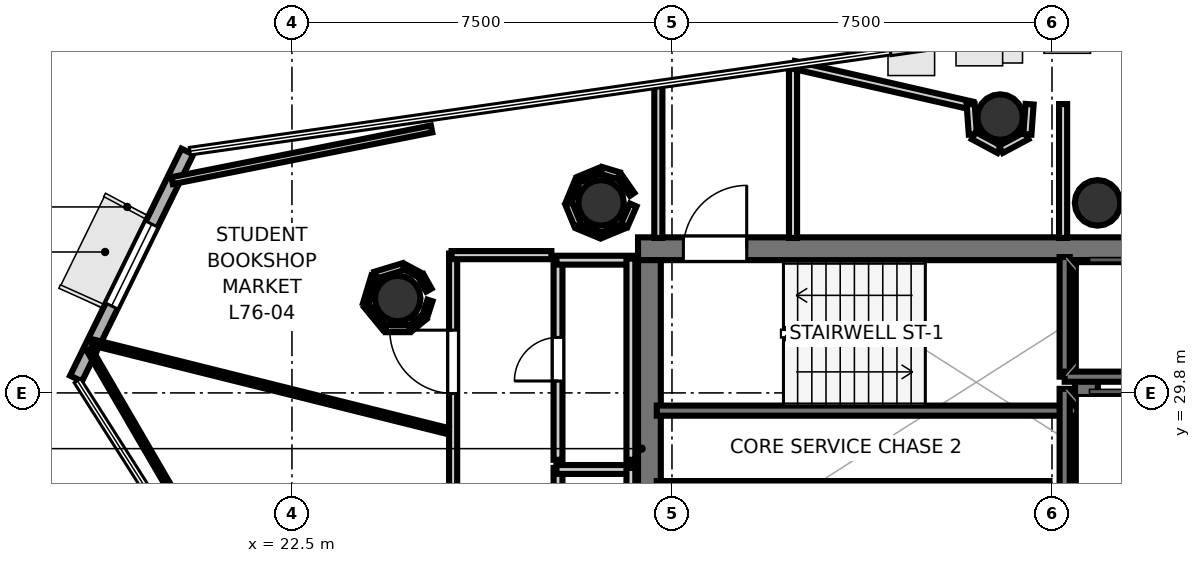
"""IFC4 building model, lengths in metres.
Left out: names, types, materials, properties, quantities, classifications, styles, units other than length and angle.
Written with IfcOpenShell. Run it as: python <this file> out.ifc"""

import sys

from ifc_helpers import new_model, si_unit, direction, frame, frame_2d, origin, origin_2d, place, context, subcontext, project, spatial, rectangle, hollow_circle, extrude, element, fill, save


model = new_model("IFC4")
c1 = context("Model", 3, precision=1e-05, world=origin(), true_north=direction((0.0, 1.0)))
c2 = subcontext(c1, "Body", "Model", "MODEL_VIEW")
j1 = project(units=[si_unit("LENGTHUNIT", "METRE"), si_unit("PLANEANGLEUNIT", "RADIAN")], contexts=[c1])
p1 = place(None, origin())
s1 = spatial("IfcSite", under=j1, at=p1, CompositionType="ELEMENT")
p2 = place(p1, origin())
s2 = spatial("IfcBuilding", under=s1, at=p2, CompositionType="ELEMENT")
p3 = place(p2, frame((0.0, 0.0, 295.4)))
s3 = spatial("IfcBuildingStorey", under=s2, at=p3, CompositionType="ELEMENT", Elevation=295.4)
p4 = place(p3, frame((29.33, 32.645, 0.0), z_axis=(0.0, 0.0, 1.0), x_axis=(1.0, 0.0, 0.0)))
e1 = element("IfcWall", 1, at=p4, inside=s3, PredefinedType="SHEAR", context=c2, shape_type="SweptSolid", body=[
    extrude(rectangle(XDim=10.52, YDim=0.45, at=frame_2d((5.26, 0.0))), origin(), (0.0, 0.0, 1.0), 3.52),
])
p5 = place(p4, frame((0.895, 0.0, 0.0)))
e2 = element("IfcOpeningElement", 2, at=p5, cuts=e1, PredefinedType="OPENING", context=c2, shape_type="SweptSolid", body=[
    extrude(rectangle(XDim=1.25, YDim=2.15, at=frame_2d((0.625, 1.075))), frame((0.0, 0.235, 0.0), z_axis=(0.0, -1.0, 0.0), x_axis=(1.0, 0.0, 0.0)), (0.0, 0.0, 1.0), 0.47),
])
for number, where, z_axis, x_axis in (
    (3, (29.555, 24.98, 0.0), (0.0, 0.0, 1.0), (0.0, 1.0, 0.0)),
    (4, (38.18, 24.98, 0.0), (0.0, 0.0, 1.0), (0.0, 1.0, 0.0)),
):
    element("IfcWall", number, at=place(p3, frame(where, z_axis=z_axis, x_axis=x_axis)), inside=s3, PredefinedType="SHEAR", context=c2, shape_type="SweptSolid", body=[
        extrude(rectangle(XDim=7.44, YDim=0.45, at=frame_2d((3.72, 0.0))), origin(), (0.0, 0.0, 1.0), 3.52),
    ])
for number, where, z_axis, x_axis in (
    (5, (28.6, 33.55, 0.0), (0.0, 0.0, 1.0), (1.0, 0.0, 0.0)),
    (6, (38.4, 33.55, 0.0), (0.0, 0.0, 1.0), (1.0, 0.0, 0.0)),
    (7, (36.476, 35.243, 0.0), (0.0, 0.0, 1.0), (1.0, 0.0, 0.0)),
    (8, (24.587, 31.663, 0.0), (0.0, 0.0, 1.0), (1.0, 0.0, 0.0)),
):
    element("IfcColumn", number, at=place(p3, frame(where, z_axis=z_axis, x_axis=x_axis)), inside=s3, PredefinedType="COLUMN", context=c2, shape_type="SweptSolid", body=[
        extrude(hollow_circle(Radius=0.45, WallThickness=0.025, at=origin_2d()), origin(), (0.0, 0.0, 1.0), 3.7),
    ])
p6 = place(p3, frame((20.436, 34.563, 0.0), z_axis=(0.0, 0.0, 1.0), x_axis=(-0.440488239438, -0.897758381145, 0.0)))
e9 = element("IfcWall", 9, at=p6, inside=s3, PredefinedType="SOLIDWALL", context=c2, shape_type="SweptSolid", body=[
    extrude(rectangle(XDim=4.99, YDim=0.26, at=frame_2d((2.495, 0.0))), origin(), (0.0, 0.0, 1.0), 3.52),
])
p7 = place(p6, frame((1.595, 0.0, 0.85)))
e10 = element("IfcOpeningElement", 10, at=p7, cuts=e9, PredefinedType="OPENING", context=c2, shape_type="SweptSolid", body=[
    extrude(rectangle(XDim=1.8, YDim=2.1, at=frame_2d((0.9, 1.05))), frame((0.0, 0.14, 0.0), z_axis=(0.0, -1.0, 0.0), x_axis=(1.0, 0.0, 0.0)), (0.0, 0.0, 1.0), 0.28),
])
p8 = place(p3, frame((29.7, 29.45, 0.0), z_axis=(0.0, 0.0, 1.0), x_axis=(1.0, 0.0, 0.0)))
e11 = element("IfcWall", 11, at=p8, inside=s3, PredefinedType="SOLIDWALL", context=c2, shape_type="SweptSolid", body=[
    extrude(rectangle(XDim=8.3, YDim=0.2, at=frame_2d((4.15, 0.0))), origin(), (0.0, 0.0, 1.0), 3.52),
])
p9 = place(p3, frame((29.7, 27.96, 0.0), z_axis=(0.0, 0.0, 1.0), x_axis=(1.0, 0.0, 0.0)))
e12 = element("IfcWall", 12, at=p9, inside=s3, PredefinedType="SOLIDWALL", context=c2, shape_type="SweptSolid", body=[
    extrude(rectangle(XDim=7.75, YDim=0.2, at=frame_2d((3.875, 0.0))), origin(), (0.0, 0.0, 1.0), 3.52),
])
p10 = place(p3, frame((37.75, 30.12, 0.0), z_axis=(0.0, 0.0, 1.0), x_axis=(0.0, 1.0, 0.0)))
e13 = element("IfcWall", 13, at=p10, inside=s3, PredefinedType="SOLIDWALL", context=c2, shape_type="SweptSolid", body=[
    extrude(rectangle(XDim=2.36, YDim=0.2, at=frame_2d((1.18, 0.0))), origin(), (0.0, 0.0, 1.0), 3.52),
])
p11 = place(p3, frame((37.75, 30.12, 0.0), z_axis=(0.0, 0.0, 1.0), x_axis=(1.0, 0.0, 0.0)))
e14 = element("IfcWall", 14, at=p11, inside=s3, PredefinedType="SOLIDWALL", context=c2, shape_type="SweptSolid", body=[
    extrude(rectangle(XDim=2.1, YDim=0.2, at=frame_2d((1.05, 0.0))), origin(), (0.0, 0.0, 1.0), 3.52),
])
p12 = place(p3, frame((37.75, 27.52, 0.0), z_axis=(0.0, 0.0, 1.0), x_axis=(0.0, 1.0, 0.0)))
e15 = element("IfcWall", 15, at=p12, inside=s3, PredefinedType="SOLIDWALL", context=c2, shape_type="SweptSolid", body=[
    extrude(rectangle(XDim=2.36, YDim=0.2, at=frame_2d((1.18, 0.0))), origin(), (0.0, 0.0, 1.0), 3.52),
])
p13 = place(p3, frame((29.731, 32.858, 0.0), z_axis=(0.0, 0.0, 1.0), x_axis=(0.0, 1.0, 0.0)))
e16 = element("IfcWall", 16, at=p13, inside=s3, PredefinedType="PARTITIONING", context=c2, shape_type="SweptSolid", body=[
    extrude(rectangle(XDim=3.053, YDim=0.16, at=frame_2d((1.526, 0.0))), origin(), (0.0, 0.0, 1.0), 2.84),
])
p14 = place(p3, frame((32.389, 36.29, 0.0), z_axis=(0.0, 0.0, 1.0), x_axis=(0.0, -1.0, 0.0)))
e17 = element("IfcWall", 17, at=p14, inside=s3, PredefinedType="PARTITIONING", context=c2, shape_type="SweptSolid", body=[
    extrude(rectangle(XDim=3.432, YDim=0.16, at=frame_2d((1.716, 0.0))), origin(), (0.0, 0.0, 1.0), 2.84),
])
p15 = place(p3, frame((27.751, 25.0, 0.0), z_axis=(0.0, 0.0, 1.0), x_axis=(0.0, 1.0, 0.0)))
e18 = element("IfcWall", 18, at=p15, inside=s3, PredefinedType="PLUMBINGWALL", context=c2, shape_type="SweptSolid", body=[
    extrude(rectangle(XDim=3.32, YDim=0.175, at=frame_2d((1.66, 0.0))), origin(), (0.0, 0.0, 1.0), 2.84),
])
p16 = place(p15, frame((1.21, 0.0, 0.0)))
e19 = element("IfcOpeningElement", 19, at=p16, cuts=e18, PredefinedType="OPENING", context=c2, shape_type="SweptSolid", body=[
    extrude(rectangle(XDim=0.9, YDim=2.1, at=frame_2d((0.45, 1.05))), frame((0.0, 0.097, 0.0), z_axis=(0.0, -1.0, 0.0), x_axis=(1.0, 0.0, 0.0)), (0.0, 0.0, 1.0), 0.195),
])
p17 = place(p3, frame((27.72, 28.289, 0.0), z_axis=(0.0, 0.0, 1.0), x_axis=(1.0, 0.0, 0.0)))
e20 = element("IfcWall", 20, at=p17, inside=s3, PredefinedType="PLUMBINGWALL", context=c2, shape_type="SweptSolid", body=[
    extrude(rectangle(XDim=1.5, YDim=0.175, at=frame_2d((0.75, 0.0))), origin(), (0.0, 0.0, 1.0), 2.84),
])
p18 = place(p3, frame((29.189, 28.32, 0.0), z_axis=(0.0, 0.0, 1.0), x_axis=(0.0, -1.0, 0.0)))
e21 = element("IfcWall", 21, at=p18, inside=s3, PredefinedType="PLUMBINGWALL", context=c2, shape_type="SweptSolid", body=[
    extrude(rectangle(XDim=3.32, YDim=0.175, at=frame_2d((1.66, 0.0))), origin(), (0.0, 0.0, 1.0), 2.84),
])
p19 = place(p3, frame((27.751, 28.48, 0.0), z_axis=(0.0, 0.0, 1.0), x_axis=(0.0, 1.0, 0.0)))
e22 = element("IfcWall", 22, at=p19, inside=s3, PredefinedType="PLUMBINGWALL", context=c2, shape_type="SweptSolid", body=[
    extrude(rectangle(XDim=3.97, YDim=0.175, at=frame_2d((1.985, 0.0))), origin(), (0.0, 0.0, 1.0), 2.84),
])
p20 = place(p19, frame((1.555, 0.0, 0.0)))
e23 = element("IfcOpeningElement", 23, at=p20, cuts=e22, PredefinedType="OPENING", context=c2, shape_type="SweptSolid", body=[
    extrude(rectangle(XDim=0.86, YDim=2.05, at=frame_2d((0.43, 1.025))), frame((0.0, 0.097, 0.0), z_axis=(0.0, -1.0, 0.0), x_axis=(1.0, 0.0, 0.0)), (0.0, 0.0, 1.0), 0.195),
])
p21 = place(p3, frame((27.72, 32.419, 0.0), z_axis=(0.0, 0.0, 1.0), x_axis=(1.0, 0.0, 0.0)))
e24 = element("IfcWall", 24, at=p21, inside=s3, PredefinedType="PLUMBINGWALL", context=c2, shape_type="SweptSolid", body=[
    extrude(rectangle(XDim=1.5, YDim=0.175, at=frame_2d((0.75, 0.0))), origin(), (0.0, 0.0, 1.0), 2.84),
])
p22 = place(p3, frame((29.189, 32.45, 0.0), z_axis=(0.0, 0.0, 1.0), x_axis=(0.0, -1.0, 0.0)))
e25 = element("IfcWall", 25, at=p22, inside=s3, PredefinedType="PLUMBINGWALL", context=c2, shape_type="SweptSolid", body=[
    extrude(rectangle(XDim=3.97, YDim=0.175, at=frame_2d((1.985, 0.0))), origin(), (0.0, 0.0, 1.0), 2.84),
])
p23 = place(p3, frame((32.405, 36.272, 0.0), z_axis=(0.0, 0.0, 1.0), x_axis=(0.974921840823, -0.222547532645, 0.0)))
e26 = element("IfcWall", 26, at=p23, inside=s3, PredefinedType="PARTITIONING", context=c2, shape_type="SweptSolid", body=[
    extrude(rectangle(XDim=3.61, YDim=0.16, at=frame_2d((1.805, 0.0))), origin(), (0.0, 0.0, 1.0), 2.84),
])
p24 = place(p3, frame((35.894, 35.498, 0.0), z_axis=(0.0, 0.0, 1.0), x_axis=(0.07354059826, -0.997292224179, 0.0)))
e27 = element("IfcWall", 27, at=p24, inside=s3, PredefinedType="PARTITIONING", context=c2, shape_type="SweptSolid", body=[
    extrude(rectangle(XDim=0.598, YDim=0.16, at=frame_2d((0.299, 0.0))), origin(), (0.0, 0.0, 1.0), 2.095),
])
for number, where, z_axis, x_axis in (
    (28, (35.954, 34.877, 0.0), (0.0, 0.0, 1.0), (0.882, -0.471, 0.0)),
    (29, (36.49, 34.606, 0.0), (0.0, 0.0, 1.0), (0.882, 0.471, 0.0)),
):
    element("IfcWall", number, at=place(p3, frame(where, z_axis=z_axis, x_axis=x_axis)), inside=s3, PredefinedType="PARTITIONING", context=c2, shape_type="SweptSolid", body=[
        extrude(rectangle(XDim=0.575, YDim=0.16, at=frame_2d((0.288, 0.0))), origin(), (0.0, 0.0, 1.0), 2.84),
    ])
p25 = place(p3, frame((37.014, 34.902, 0.0), z_axis=(0.0, 0.0, 1.0), x_axis=(0.073134230676, 0.997322106595, 0.0)))
e30 = element("IfcWall", 30, at=p25, inside=s3, PredefinedType="PARTITIONING", context=c2, shape_type="SweptSolid", body=[
    extrude(rectangle(XDim=0.598, YDim=0.16, at=frame_2d((0.299, 0.0))), origin(), (0.0, 0.0, 1.0), 2.84),
])
p26 = place(p3, frame((37.719, 35.5, 0.0), z_axis=(0.0, 0.0, 1.0), x_axis=(0.0, -1.0, 0.0)))
e31 = element("IfcWall", 31, at=p26, inside=s3, PredefinedType="PARTITIONING", context=c2, shape_type="SweptSolid", body=[
    extrude(rectangle(XDim=2.642, YDim=0.16, at=frame_2d((1.321, 0.0))), origin(), (0.0, 0.0, 1.0), 2.84),
])
p27 = place(p3, frame((25.681, 18.372, 0.0), z_axis=(0.0, 0.0, 1.0), x_axis=(0.0, 1.0, 0.0)))
e32 = element("IfcWall", 32, at=p27, inside=s3, PredefinedType="PARTITIONING", context=c2, shape_type="SweptSolid", body=[
    extrude(rectangle(XDim=14.178, YDim=0.16, at=frame_2d((7.089, 0.0))), origin(), (0.0, 0.0, 1.0), 2.84),
])
p28 = place(p27, frame((11.417, 0.0, 0.0)))
e33 = element("IfcOpeningElement", 33, at=p28, cuts=e32, PredefinedType="OPENING", context=c2, shape_type="SweptSolid", body=[
    extrude(rectangle(XDim=1.25, YDim=2.2, at=frame_2d((0.625, 1.1))), frame((0.0, 0.09, 0.0), z_axis=(0.0, -1.0, 0.0), x_axis=(1.0, 0.0, 0.0)), (0.0, 0.0, 1.0), 0.18),
])
p29 = place(p27, frame((5.215, 0.0, 0.0)))
e34 = element("IfcOpeningElement", 34, at=p29, cuts=e32, PredefinedType="OPENING", context=c2, shape_type="SweptSolid", body=[
    extrude(rectangle(XDim=1.25, YDim=2.2, at=frame_2d((0.625, 1.1))), frame((0.0, 0.09, 0.0), z_axis=(0.0, -1.0, 0.0), x_axis=(1.0, 0.0, 0.0)), (0.0, 0.0, 1.0), 0.18),
])
p30 = place(p3, frame((25.65, 32.519, 0.0), z_axis=(0.0, 0.0, 1.0), x_axis=(1.0, 0.0, 0.0)))
e35 = element("IfcWall", 35, at=p30, inside=s3, PredefinedType="PARTITIONING", context=c2, shape_type="SweptSolid", body=[
    extrude(rectangle(XDim=1.97, YDim=0.16, at=frame_2d((0.985, 0.0))), origin(), (0.0, 0.0, 1.0), 2.84),
])
p31 = place(p3, frame((56.387, 35.955, 0.0), z_axis=(0.0, 0.0, 1.0), x_axis=(-0.547085490545, -0.837076738439, 0.0)))
e36 = element("IfcWall", 36, at=p31, inside=s3, PredefinedType="PARTITIONING", context=c2, shape_type="SweptSolid", body=[
    extrude(rectangle(XDim=34.443, YDim=0.12, at=frame_2d((17.221, 0.0))), origin(), (0.0, 0.0, 1.0), 2.095),
])
p32 = place(p3, frame((25.203, 31.829, 0.0), z_axis=(0.0, 0.0, 1.0), x_axis=(-0.488926990846, 0.872324708823, 0.0)))
e37 = element("IfcWall", 37, at=p32, inside=s3, PredefinedType="PARTITIONING", context=c2, shape_type="SweptSolid", body=[
    extrude(rectangle(XDim=0.322, YDim=0.12, at=frame_2d((0.161, 0.0))), origin(), (0.0, 0.0, 1.0), 2.84),
])
p33 = place(p3, frame((25.033, 32.122, 0.0), z_axis=(0.0, 0.0, 1.0), x_axis=(-0.881817981942, 0.471589913721, 0.0)))
e38 = element("IfcWall", 38, at=p33, inside=s3, PredefinedType="PARTITIONING", context=c2, shape_type="SweptSolid", body=[
    extrude(rectangle(XDim=0.354, YDim=0.105, at=frame_2d((0.177, 0.0))), origin(), (0.0, 0.0, 1.0), 2.84),
])
p34 = place(p3, frame((24.697, 32.291, 0.0), z_axis=(0.0, 0.0, 1.0), x_axis=(-0.956910072495, -0.290384423064, 0.0)))
e39 = element("IfcWall", 39, at=p34, inside=s3, PredefinedType="PARTITIONING", context=c2, shape_type="SweptSolid", body=[
    extrude(rectangle(XDim=0.575, YDim=0.14, at=frame_2d((0.288, 0.0))), origin(), (0.0, 0.0, 1.0), 2.84),
])
p35 = place(p3, frame((24.126, 32.103, 0.0), z_axis=(0.0, 0.0, 1.0), x_axis=(-0.290384423064, -0.956910072495, 0.0)))
e40 = element("IfcWall", 40, at=p35, inside=s3, PredefinedType="PARTITIONING", context=c2, shape_type="SweptSolid", body=[
    extrude(rectangle(XDim=0.575, YDim=0.12, at=frame_2d((0.288, 0.0))), origin(), (0.0, 0.0, 1.0), 2.84),
])
p36 = place(p3, frame((23.965, 31.524, 0.0), z_axis=(0.0, 0.0, 1.0), x_axis=(0.634277575631, -0.77310539841, 0.0)))
e41 = element("IfcWall", 41, at=p36, inside=s3, PredefinedType="PARTITIONING", context=c2, shape_type="SweptSolid", body=[
    extrude(rectangle(XDim=0.575, YDim=0.105, at=frame_2d((0.288, 0.0))), origin(), (0.0, 0.0, 1.0), 2.84),
])
p37 = place(p3, frame((24.354, 31.068, 0.0), z_axis=(0.0, 0.0, 1.0), x_axis=(1.0, 0.0, 0.0)))
e42 = element("IfcWall", 42, at=p37, inside=s3, PredefinedType="PARTITIONING", context=c2, shape_type="SweptSolid", body=[
    extrude(rectangle(XDim=0.467, YDim=0.14, at=frame_2d((0.233, 0.0))), origin(), (0.0, 0.0, 1.0), 2.84),
])
p38 = place(p3, frame((24.84, 31.075, 0.0), z_axis=(0.0, 0.0, 1.0), x_axis=(0.773281307259, 0.634063103992, 0.0)))
e43 = element("IfcWall", 43, at=p38, inside=s3, PredefinedType="PARTITIONING", context=c2, shape_type="SweptSolid", body=[
    extrude(rectangle(XDim=0.354, YDim=0.12, at=frame_2d((0.177, 0.0))), origin(), (0.0, 0.0, 1.0), 2.84),
])
p39 = place(p3, frame((25.124, 31.315, 0.0), z_axis=(0.0, 0.0, 1.0), x_axis=(0.306761714687, 0.951786347035, 0.0)))
e44 = element("IfcWall", 44, at=p39, inside=s3, PredefinedType="PARTITIONING", context=c2, shape_type="SweptSolid", body=[
    extrude(rectangle(XDim=0.325, YDim=0.105, at=frame_2d((0.163, 0.0))), origin(), (0.0, 0.0, 1.0), 2.84),
])
p40 = place(p3, frame((25.577, 29.048, 0.0), z_axis=(0.0, 0.0, 1.0), x_axis=(-0.970297325038, 0.241915483226, 0.0)))
e45 = element("IfcWall", 45, at=p40, inside=s3, PredefinedType="PARTITIONING", context=c2, shape_type="SweptSolid", body=[
    extrude(rectangle(XDim=7.226, YDim=0.12, at=frame_2d((3.613, 0.0))), origin(), (0.0, 0.0, 1.0), 2.84),
])
p41 = place(p3, frame((20.136, 33.989, 0.0), z_axis=(0.0, 0.0, 1.0), x_axis=(0.980720741486, 0.195414501046, 0.0)))
e46 = element("IfcWall", 46, at=p41, inside=s3, PredefinedType="PARTITIONING", context=c2, shape_type="SweptSolid", body=[
    extrude(rectangle(XDim=5.22, YDim=0.14, at=frame_2d((2.61, 0.0))), origin(), (0.0, 0.0, 1.0), 2.84),
])
p42 = place(p3, frame((29.214, 33.719, 0.0), z_axis=(0.0, 0.0, 1.0), x_axis=(-0.57410245878, 0.818783467605, 0.0)))
e47 = element("IfcWall", 47, at=p42, inside=s3, PredefinedType="PARTITIONING", context=c2, shape_type="SweptSolid", body=[
    extrude(rectangle(XDim=0.435, YDim=0.105, at=frame_2d((0.218, 0.0))), origin(), (0.0, 0.0, 1.0), 2.84),
])
p43 = place(p3, frame((28.948, 34.087, 0.0), z_axis=(0.0, 0.0, 1.0), x_axis=(-0.957007018611, 0.290064762301, 0.0)))
e48 = element("IfcWall", 48, at=p43, inside=s3, PredefinedType="PARTITIONING", context=c2, shape_type="SweptSolid", body=[
    extrude(rectangle(XDim=0.354, YDim=0.14, at=frame_2d((0.177, 0.0))), origin(), (0.0, 0.0, 1.0), 2.84),
])
p44 = place(p3, frame((28.588, 34.189, 0.0), z_axis=(0.0, 0.0, 1.0), x_axis=(-0.923863886655, -0.382721202621, 0.0)))
e49 = element("IfcWall", 49, at=p44, inside=s3, PredefinedType="PARTITIONING", context=c2, shape_type="SweptSolid", body=[
    extrude(rectangle(XDim=0.467, YDim=0.12, at=frame_2d((0.233, 0.0))), origin(), (0.0, 0.0, 1.0), 2.84),
])
p45 = place(p3, frame((28.14, 33.993, 0.0), z_axis=(0.0, 0.0, 1.0), x_axis=(-0.382459617246, -0.923972208011, 0.0)))
e50 = element("IfcWall", 50, at=p45, inside=s3, PredefinedType="PARTITIONING", context=c2, shape_type="SweptSolid", body=[
    extrude(rectangle(XDim=0.467, YDim=0.105, at=frame_2d((0.233, 0.0))), origin(), (0.0, 0.0, 1.0), 2.84),
])
p46 = place(p3, frame((27.961, 33.538, 0.0), z_axis=(0.0, 0.0, 1.0), x_axis=(0.382274809242, -0.924048683901, 0.0)))
e51 = element("IfcWall", 51, at=p46, inside=s3, PredefinedType="PARTITIONING", context=c2, shape_type="SweptSolid", body=[
    extrude(rectangle(XDim=0.467, YDim=0.14, at=frame_2d((0.233, 0.0))), origin(), (0.0, 0.0, 1.0), 2.84),
])
p47 = place(p3, frame((28.157, 33.09, 0.0), z_axis=(0.0, 0.0, 1.0), x_axis=(0.923863886655, -0.382721202621, 0.0)))
e52 = element("IfcWall", 52, at=p47, inside=s3, PredefinedType="PARTITIONING", context=c2, shape_type="SweptSolid", body=[
    extrude(rectangle(XDim=0.467, YDim=0.12, at=frame_2d((0.233, 0.0))), origin(), (0.0, 0.0, 1.0), 2.84),
])
p48 = place(p3, frame((28.612, 32.911, 0.0), z_axis=(0.0, 0.0, 1.0), x_axis=(0.923863886655, 0.382721202621, 0.0)))
e53 = element("IfcWall", 53, at=p48, inside=s3, PredefinedType="PARTITIONING", context=c2, shape_type="SweptSolid", body=[
    extrude(rectangle(XDim=0.467, YDim=0.105, at=frame_2d((0.233, 0.0))), origin(), (0.0, 0.0, 1.0), 2.84),
])
p49 = place(p3, frame((29.06, 33.106, 0.0), z_axis=(0.0, 0.0, 1.0), x_axis=(0.400352069216, 0.916361402872, 0.0)))
e54 = element("IfcWall", 54, at=p49, inside=s3, PredefinedType="PARTITIONING", context=c2, shape_type="SweptSolid", body=[
    extrude(rectangle(XDim=0.439, YDim=0.14, at=frame_2d((0.219, 0.0))), origin(), (0.0, 0.0, 1.0), 2.84),
])
p50 = place(p3, frame((22.117, 24.438, 0.0), z_axis=(0.0, 0.0, 1.0), x_axis=(-0.50301807404, 0.864275891825, 0.0)))
e55 = element("IfcWall", 55, at=p50, inside=s3, PredefinedType="PARTITIONING", context=c2, shape_type="SweptSolid", body=[
    extrude(rectangle(XDim=7.192, YDim=0.105, at=frame_2d((3.596, 0.0))), origin(), (0.0, 0.0, 1.0), 2.84),
])
p51 = place(p5, origin())
e56 = element("IfcDoor", 56, at=p51, inside=s3, OperationType="SINGLE_SWING_RIGHT", PredefinedType="DOOR", context=c2, shape_type="SweptSolid", body=[
    extrude(rectangle(XDim=1.25, YDim=2.15, at=frame_2d((0.625, 1.075))), frame((0.0, 0.025, 0.0), z_axis=(0.0, -1.0, 0.0), x_axis=(1.0, 0.0, 0.0)), (0.0, 0.0, 1.0), 0.05),
])
fill(e2, e56)
p52 = place(p20, origin())
e57 = element("IfcDoor", 57, at=p52, inside=s3, OperationType="SINGLE_SWING_LEFT", PredefinedType="DOOR", context=c2, shape_type="SweptSolid", body=[
    extrude(rectangle(XDim=0.86, YDim=2.05, at=frame_2d((0.43, 1.025))), frame((0.0, 0.025, 0.0), z_axis=(0.0, -1.0, 0.0), x_axis=(1.0, 0.0, 0.0)), (0.0, 0.0, 1.0), 0.05),
])
fill(e23, e57)
p53 = place(p28, origin())
e58 = element("IfcDoor", 58, at=p53, inside=s3, OperationType="SINGLE_SWING_RIGHT", PredefinedType="DOOR", context=c2, shape_type="SweptSolid", body=[
    extrude(rectangle(XDim=1.25, YDim=2.2, at=frame_2d((0.625, 1.1))), frame((0.0, 0.025, 0.0), z_axis=(0.0, -1.0, 0.0), x_axis=(1.0, 0.0, 0.0)), (0.0, 0.0, 1.0), 0.05),
])
fill(e33, e58)
p54 = place(p7, origin())
e59 = element("IfcWindow", 59, at=p54, inside=s3, PartitioningType="SINGLE_PANEL", PredefinedType="WINDOW", context=c2, shape_type="SweptSolid", body=[
    extrude(rectangle(XDim=1.8, YDim=2.1, at=frame_2d((0.9, 1.05))), frame((0.0, 0.03, 0.0), z_axis=(0.0, -1.0, 0.0), x_axis=(1.0, 0.0, 0.0)), (0.0, 0.0, 1.0), 0.06),
])
fill(e10, e59)
save(model, sys.argv[1])
